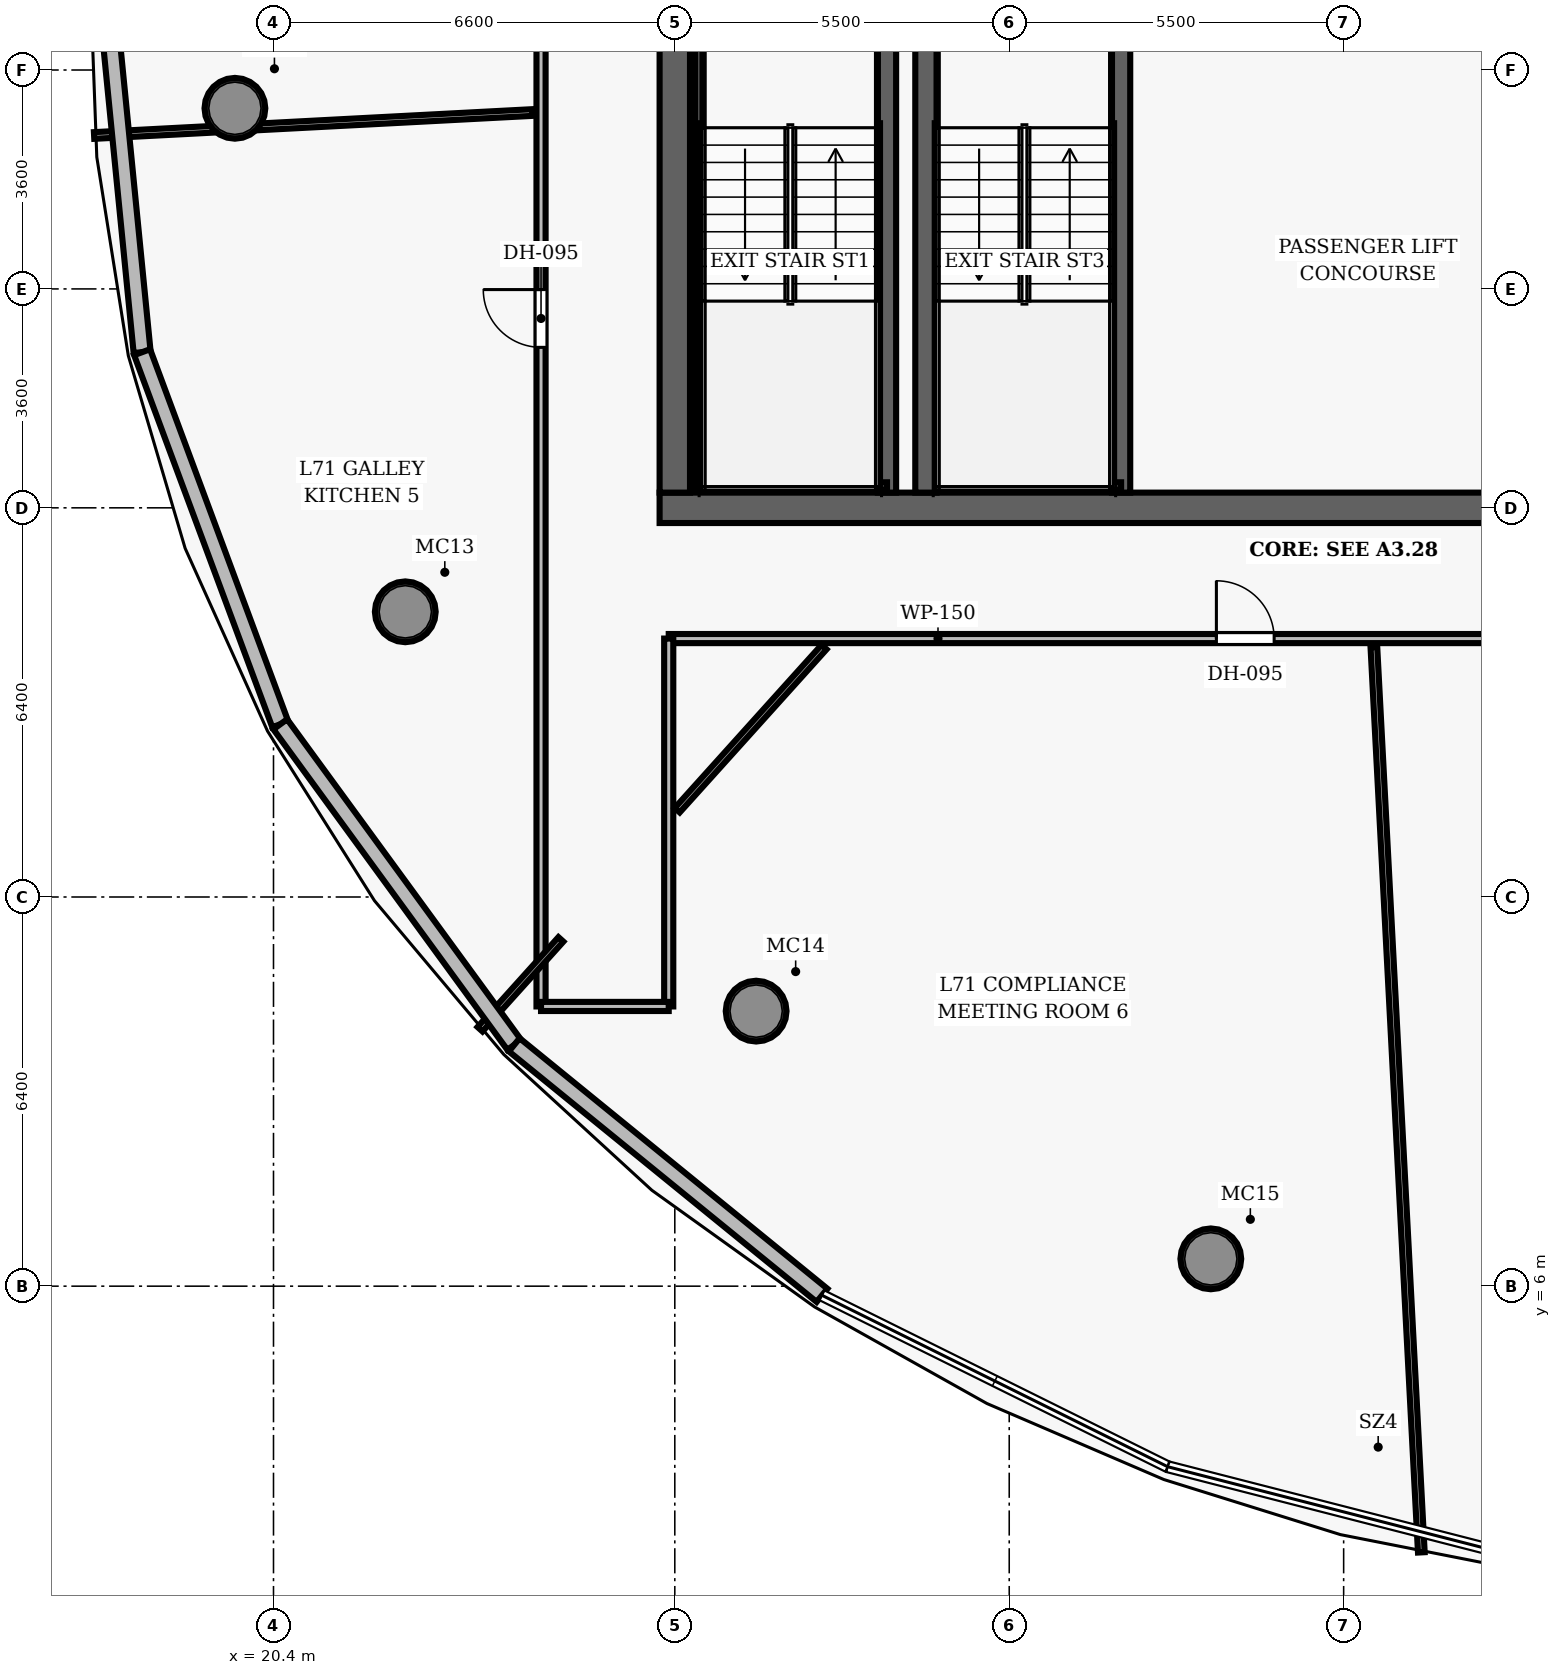
"""IFC4 building model, lengths in metres.
Left out: names, types, materials, properties, quantities, classifications, styles, units other than length and angle.
Written with IfcOpenShell. Run it as: python <this file> out.ifc"""

import sys

from ifc_helpers import new_model, si_unit, direction, frame, frame_2d, origin, origin_2d, place, context, subcontext, project, spatial, rectangle, hollow_circle, extrude, element, fill, save


model = new_model("IFC4")
c1 = context("Model", 3, precision=1e-05, world=origin(), true_north=direction((0.0, 1.0)))
c2 = subcontext(c1, "Body", "Model", "MODEL_VIEW")
j1 = project(units=[si_unit("LENGTHUNIT", "METRE"), si_unit("PLANEANGLEUNIT", "RADIAN")], contexts=[c1])
p1 = place(None, origin())
s1 = spatial("IfcSite", under=j1, at=p1, CompositionType="ELEMENT")
p2 = place(p1, origin())
s2 = spatial("IfcBuilding", under=s1, at=p2, CompositionType="ELEMENT")
p3 = place(p2, frame((0.0, 0.0, 280.55)))
s3 = spatial("IfcBuildingStorey", under=s2, at=p3, CompositionType="ELEMENT", Elevation=280.55)
p4 = place(p3, frame((26.75, 18.8, 0.0), z_axis=(0.0, 0.0, 1.0), x_axis=(1.0, 0.0, 0.0)))
e1 = element("IfcWall", 1, at=p4, inside=s3, PredefinedType="SHEAR", context=c2, shape_type="SweptSolid", body=[
    extrude(rectangle(XDim=22.5, YDim=0.5, at=frame_2d((11.25, 0.0))), origin(), (0.0, 0.0, 1.0), 3.85),
])
p5 = place(p4, frame((14.47, 0.0, 0.0)))
e2 = element("IfcOpeningElement", 2, at=p5, cuts=e1, PredefinedType="OPENING", context=c2, shape_type="SweptSolid", body=[
    extrude(rectangle(XDim=1.05, YDim=2.15, at=frame_2d((0.525, 1.075))), frame((0.0, 0.26, 0.0), z_axis=(0.0, -1.0, 0.0), x_axis=(1.0, 0.0, 0.0)), (0.0, 0.0, 1.0), 0.52),
])
p6 = place(p3, frame((27.0, 19.05, 0.0), z_axis=(0.0, 0.0, 1.0), x_axis=(0.0, 1.0, 0.0)))
e3 = element("IfcWall", 3, at=p6, inside=s3, PredefinedType="SHEAR", context=c2, shape_type="SweptSolid", body=[
    extrude(rectangle(XDim=13.9, YDim=0.5, at=frame_2d((6.95, 0.0))), origin(), (0.0, 0.0, 1.0), 3.85),
])
p7 = place(p6, frame((8.2, 0.0, 0.0)))
e4 = element("IfcOpeningElement", 4, at=p7, cuts=e3, PredefinedType="OPENING", context=c2, shape_type="SweptSolid", body=[
    extrude(rectangle(XDim=1.05, YDim=2.15, at=frame_2d((0.525, 1.075))), frame((0.0, 0.26, 0.0), z_axis=(0.0, -1.0, 0.0), x_axis=(1.0, 0.0, 0.0)), (0.0, 0.0, 1.0), 0.52),
])
p8 = place(p3, frame((31.13, 19.05, 0.0), z_axis=(0.0, 0.0, 1.0), x_axis=(0.0, 1.0, 0.0)))
e5 = element("IfcWall", 5, at=p8, inside=s3, PredefinedType="SHEAR", context=c2, shape_type="SweptSolid", body=[
    extrude(rectangle(XDim=13.9, YDim=0.35, at=frame_2d((6.95, 0.0))), origin(), (0.0, 0.0, 1.0), 3.85),
])
for number, where, z_axis, x_axis in (
    (6, (19.765, 25.371, 0.0), (0.0, 0.0, 1.0), (1.0, 0.0, 0.0)),
    (7, (22.567, 17.09, 0.0), (0.0, 0.0, 1.0), (1.0, 0.0, 0.0)),
    (8, (28.338, 10.523, 0.0), (0.0, 0.0, 1.0), (1.0, 0.0, 0.0)),
    (9, (35.815, 6.449, 0.0), (0.0, 0.0, 1.0), (1.0, 0.0, 0.0)),
):
    element("IfcColumn", number, at=place(p3, frame(where, z_axis=z_axis, x_axis=x_axis)), inside=s3, PredefinedType="COLUMN", context=c2, shape_type="SweptSolid", body=[
        extrude(hollow_circle(Radius=0.5, WallThickness=0.045, at=origin_2d()), origin(), (0.0, 0.0, 1.0), 3.85),
    ])
p9 = place(p3, frame((30.49, 19.05, 0.0), z_axis=(0.0, 0.0, 1.0), x_axis=(0.0, 1.0, 0.0)))
e10 = element("IfcWall", 10, at=p9, inside=s3, PredefinedType="SHEAR", context=c2, shape_type="SweptSolid", body=[
    extrude(rectangle(XDim=7.5, YDim=0.3, at=frame_2d((3.75, 0.0))), origin(), (0.0, 0.0, 1.0), 3.85),
])
p10 = place(p3, frame((27.395, 19.1, 0.0), z_axis=(0.0, 0.0, 1.0), x_axis=(0.0, 1.0, 0.0)))
e11 = element("IfcWall", 11, at=p10, inside=s3, PredefinedType="SHEAR", context=c2, shape_type="SweptSolid", body=[
    extrude(rectangle(XDim=7.45, YDim=0.12, at=frame_2d((3.725, 0.0))), origin(), (0.0, 0.0, 1.0), 3.85),
])
p11 = place(p3, frame((27.395, 19.16, 0.0), z_axis=(0.0, 0.0, 1.0), x_axis=(1.0, 0.0, 0.0)))
e12 = element("IfcWall", 12, at=p11, inside=s3, PredefinedType="SHEAR", context=c2, shape_type="SweptSolid", body=[
    extrude(rectangle(XDim=3.095, YDim=0.12, at=frame_2d((1.547, 0.0))), origin(), (0.0, 0.0, 1.0), 3.85),
])
p12 = place(p3, frame((34.34, 19.05, 0.0), z_axis=(0.0, 0.0, 1.0), x_axis=(0.0, 1.0, 0.0)))
e13 = element("IfcWall", 13, at=p12, inside=s3, PredefinedType="SHEAR", context=c2, shape_type="SweptSolid", body=[
    extrude(rectangle(XDim=7.5, YDim=0.3, at=frame_2d((3.75, 0.0))), origin(), (0.0, 0.0, 1.0), 3.85),
])
p13 = place(p3, frame((31.3, 19.16, 0.0), z_axis=(0.0, 0.0, 1.0), x_axis=(1.0, 0.0, 0.0)))
e14 = element("IfcWall", 14, at=p13, inside=s3, PredefinedType="SHEAR", context=c2, shape_type="SweptSolid", body=[
    extrude(rectangle(XDim=3.04, YDim=0.12, at=frame_2d((1.52, 0.0))), origin(), (0.0, 0.0, 1.0), 3.85),
])
p14 = place(p3, frame((26.9, 16.65, 0.0), z_axis=(0.0, 0.0, 1.0), x_axis=(1.0, 0.0, 0.0)))
e15 = element("IfcWall", 15, at=p14, inside=s3, PredefinedType="PARTITIONING", context=c2, shape_type="SweptSolid", body=[
    extrude(rectangle(XDim=22.2, YDim=0.15, at=frame_2d((11.1, 0.0))), origin(), (0.0, 0.0, 1.0), 3.04),
])
p15 = place(p14, frame((9.007, 0.0, 0.0)))
e16 = element("IfcOpeningElement", 16, at=p15, cuts=e15, PredefinedType="OPENING", context=c2, shape_type="SweptSolid", body=[
    extrude(rectangle(XDim=0.95, YDim=2.15, at=frame_2d((0.475, 1.075))), frame((0.0, 0.085, 0.0), z_axis=(0.0, -1.0, 0.0), x_axis=(1.0, 0.0, 0.0)), (0.0, 0.0, 1.0), 0.17),
])
p16 = place(p14, frame((14.557, 0.0, 0.0)))
e17 = element("IfcOpeningElement", 17, at=p16, cuts=e15, PredefinedType="OPENING", context=c2, shape_type="SweptSolid", body=[
    extrude(rectangle(XDim=0.95, YDim=2.15, at=frame_2d((0.475, 1.075))), frame((0.0, 0.085, 0.0), z_axis=(0.0, -1.0, 0.0), x_axis=(1.0, 0.0, 0.0)), (0.0, 0.0, 1.0), 0.17),
])
p17 = place(p3, frame((24.8, 10.6, 0.0), z_axis=(0.0, 0.0, 1.0), x_axis=(0.0, 1.0, 0.0)))
e18 = element("IfcWall", 18, at=p17, inside=s3, PredefinedType="PARTITIONING", context=c2, shape_type="SweptSolid", body=[
    extrude(rectangle(XDim=30.8, YDim=0.15, at=frame_2d((15.4, 0.0))), origin(), (0.0, 0.0, 1.0), 3.04),
])
p18 = place(p17, frame((18.314, 0.0, 0.0)))
e19 = element("IfcOpeningElement", 19, at=p18, cuts=e18, PredefinedType="OPENING", context=c2, shape_type="SweptSolid", body=[
    extrude(rectangle(XDim=1.5, YDim=2.2, at=frame_2d((0.75, 1.1))), frame((0.0, 0.085, 0.0), z_axis=(0.0, -1.0, 0.0), x_axis=(1.0, 0.0, 0.0)), (0.0, 0.0, 1.0), 0.17),
])
p19 = place(p17, frame((10.839, 0.0, 0.0)))
e20 = element("IfcOpeningElement", 20, at=p19, cuts=e18, PredefinedType="OPENING", context=c2, shape_type="SweptSolid", body=[
    extrude(rectangle(XDim=0.95, YDim=2.15, at=frame_2d((0.475, 1.075))), frame((0.0, 0.085, 0.0), z_axis=(0.0, -1.0, 0.0), x_axis=(1.0, 0.0, 0.0)), (0.0, 0.0, 1.0), 0.17),
])
p20 = place(p3, frame((26.9, 10.6, 0.0), z_axis=(0.0, 0.0, 1.0), x_axis=(0.0, 1.0, 0.0)))
e21 = element("IfcWall", 21, at=p20, inside=s3, PredefinedType="PARTITIONING", context=c2, shape_type="SweptSolid", body=[
    extrude(rectangle(XDim=6.05, YDim=0.15, at=frame_2d((3.025, 0.0))), origin(), (0.0, 0.0, 1.0), 3.04),
])
p21 = place(p3, frame((24.8, 10.6, 0.0), z_axis=(0.0, 0.0, 1.0), x_axis=(1.0, 0.0, 0.0)))
e22 = element("IfcWall", 22, at=p21, inside=s3, PredefinedType="PARTITIONING", context=c2, shape_type="SweptSolid", body=[
    extrude(rectangle(XDim=2.1, YDim=0.15, at=frame_2d((1.05, 0.0))), origin(), (0.0, 0.0, 1.0), 3.04),
])
p22 = place(p3, frame((24.66, 25.301, 0.0), z_axis=(0.0, 0.0, 1.0), x_axis=(-0.998631060723, -0.05230683091, 0.0)))
e23 = element("IfcWall", 23, at=p22, inside=s3, PredefinedType="PARTITIONING", context=c2, shape_type="SweptSolid", body=[
    extrude(rectangle(XDim=7.22, YDim=0.11, at=frame_2d((3.61, 0.0))), origin(), (0.0, 0.0, 1.0), 3.04),
])
p23 = place(p3, frame((29.455, 16.51, 0.0), z_axis=(0.0, 0.0, 1.0), x_axis=(-0.669102991337, -0.743169689226, 0.0)))
e24 = element("IfcWall", 24, at=p23, inside=s3, PredefinedType="PARTITIONING", context=c2, shape_type="SweptSolid", body=[
    extrude(rectangle(XDim=3.609, YDim=0.11, at=frame_2d((1.805, 0.0))), origin(), (0.0, 0.0, 1.0), 3.04),
])
p24 = place(p3, frame((25.127, 11.703, 0.0), z_axis=(0.0, 0.0, 1.0), x_axis=(-0.669113972623, -0.743159802223, 0.0)))
e25 = element("IfcWall", 25, at=p24, inside=s3, PredefinedType="PARTITIONING", context=c2, shape_type="SweptSolid", body=[
    extrude(rectangle(XDim=1.988, YDim=0.11, at=frame_2d((0.994, 0.0))), origin(), (0.0, 0.0, 1.0), 3.04),
])
p25 = place(p3, frame((38.497, 16.51, 0.0), z_axis=(0.0, 0.0, 1.0), x_axis=(0.052337935775, -0.99862943101, 0.0)))
e26 = element("IfcWall", 26, at=p25, inside=s3, PredefinedType="PARTITIONING", context=c2, shape_type="SweptSolid", body=[
    extrude(rectangle(XDim=14.908, YDim=0.11, at=frame_2d((7.454, 0.0))), origin(), (0.0, 0.0, 1.0), 3.04),
])
p26 = place(p3, frame((18.239, 21.36, 0.0), z_axis=(0.0, 0.0, 1.0), x_axis=(-0.098314662397, 0.9951553784, 0.0)))
e27 = element("IfcWall", 27, at=p26, inside=s3, PredefinedType="SOLIDWALL", context=c2, shape_type="SweptSolid", body=[
    extrude(rectangle(XDim=6.526, YDim=0.28, at=frame_2d((3.263, 0.0))), origin(), (0.0, 0.0, 1.0), 3.625),
])
p27 = place(p3, frame((20.511, 15.24, 0.0), z_axis=(0.0, 0.0, 1.0), x_axis=(-0.348039084876, 0.937480024, 0.0)))
e28 = element("IfcWall", 28, at=p27, inside=s3, PredefinedType="SOLIDWALL", context=c2, shape_type="SweptSolid", body=[
    extrude(rectangle(XDim=6.527, YDim=0.28, at=frame_2d((3.264, 0.0))), origin(), (0.0, 0.0, 1.0), 3.625),
])
p28 = place(p3, frame((24.36, 9.969, 0.0), z_axis=(0.0, 0.0, 1.0), x_axis=(-0.589656401391, 0.807654213323, 0.0)))
e29 = element("IfcWall", 29, at=p28, inside=s3, PredefinedType="SOLIDWALL", context=c2, shape_type="SweptSolid", body=[
    extrude(rectangle(XDim=6.527, YDim=0.28, at=frame_2d((3.263, 0.0))), origin(), (0.0, 0.0, 1.0), 3.625),
])
p29 = place(p3, frame((29.421, 5.849, 0.0), z_axis=(0.0, 0.0, 1.0), x_axis=(-0.775578189182, 0.631251512842, 0.0)))
e30 = element("IfcWall", 30, at=p29, inside=s3, PredefinedType="SOLIDWALL", context=c2, shape_type="SweptSolid", body=[
    extrude(rectangle(XDim=6.526, YDim=0.28, at=frame_2d((3.263, 0.0))), origin(), (0.0, 0.0, 1.0), 3.625),
])
p30 = place(p19, origin())
e31 = element("IfcDoor", 31, at=p30, inside=s3, OperationType="SINGLE_SWING_RIGHT", PredefinedType="DOOR", context=c2, shape_type="SweptSolid", body=[
    extrude(rectangle(XDim=0.95, YDim=2.15, at=frame_2d((0.475, 1.075))), frame((0.0, 0.025, 0.0), z_axis=(0.0, -1.0, 0.0), x_axis=(1.0, 0.0, 0.0)), (0.0, 0.0, 1.0), 0.05),
])
fill(e20, e31)
p31 = place(p15, origin())
e32 = element("IfcDoor", 32, at=p31, inside=s3, OperationType="SINGLE_SWING_LEFT", PredefinedType="DOOR", context=c2, shape_type="SweptSolid", body=[
    extrude(rectangle(XDim=0.95, YDim=2.15, at=frame_2d((0.475, 1.075))), frame((0.0, 0.025, 0.0), z_axis=(0.0, -1.0, 0.0), x_axis=(1.0, 0.0, 0.0)), (0.0, 0.0, 1.0), 0.05),
])
fill(e16, e32)
save(model, sys.argv[1])
